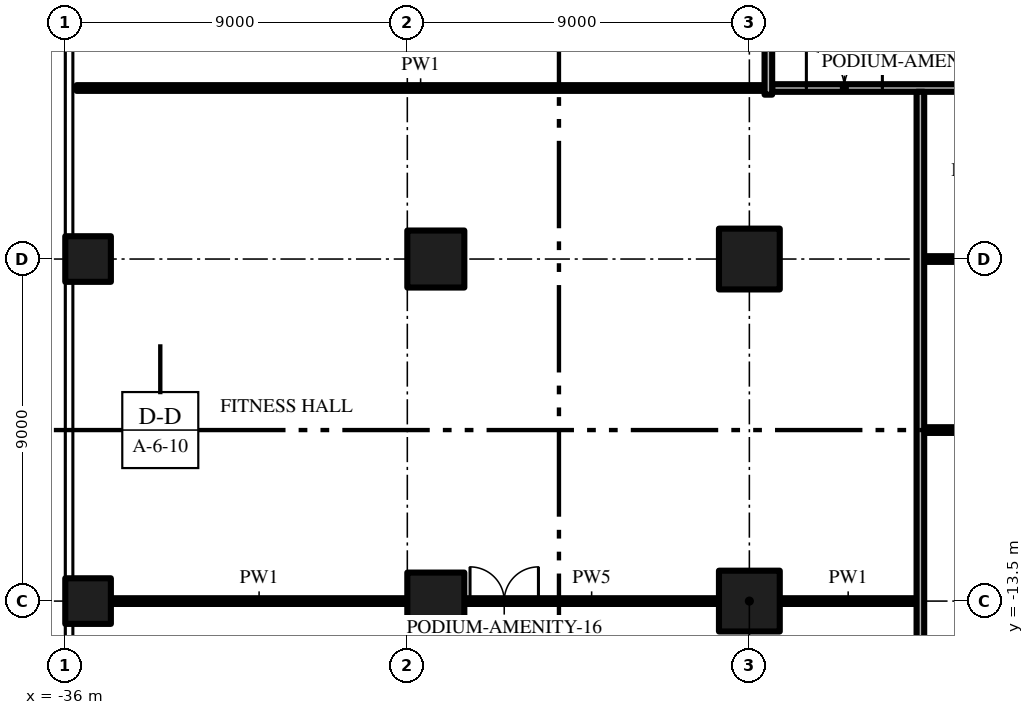
"""IFC4 building model, lengths in metres.
Left out: names, types, materials, properties, quantities, classifications, styles, units other than length and angle.
Written with IfcOpenShell. Run it as: python <this file> out.ifc"""

import sys

from ifc_helpers import new_model, si_unit, direction, frame, frame_2d, origin, origin_2d, place, context, subcontext, project, spatial, rectangle, extrude, element, fill, save


model = new_model("IFC4")
c1 = context("Model", 3, precision=1e-05, world=origin(), true_north=direction((0.0, 1.0)))
c2 = subcontext(c1, "Body", "Model", "MODEL_VIEW")
j1 = project(units=[si_unit("LENGTHUNIT", "METRE"), si_unit("PLANEANGLEUNIT", "RADIAN")], contexts=[c1])
p1 = place(None, origin())
s1 = spatial("IfcSite", under=j1, at=p1, CompositionType="ELEMENT")
p2 = place(p1, origin())
s2 = spatial("IfcBuilding", under=s1, at=p2, CompositionType="ELEMENT")
p3 = place(p2, frame((0.0, 0.0, 6.0)))
s3 = spatial("IfcBuildingStorey", under=s2, at=p3, CompositionType="ELEMENT", Elevation=6.0)
for number, where, z_axis, x_axis in (
    (1, (-35.4, -13.5, 0.0), (0.0, 0.0, 1.0), (1.0, 0.0, 0.0)),
    (2, (-35.4, -4.5, 0.0), (0.0, 0.0, 1.0), (1.0, 0.0, 0.0)),
):
    element("IfcColumn", number, at=place(p3, frame(where, z_axis=z_axis, x_axis=x_axis)), inside=s3, PredefinedType="COLUMN", context=c2, shape_type="SweptSolid", body=[
        extrude(rectangle(XDim=1.2, YDim=1.2, at=origin_2d()), origin(), (0.0, 0.0, 1.0), 4.15),
    ])
for number, where, z_axis, x_axis in (
    (3, (-18.0, -13.5, 0.0), (0.0, 0.0, 1.0), (1.0, 0.0, 0.0)),
    (4, (-18.0, -4.5, 0.0), (0.0, 0.0, 1.0), (1.0, 0.0, 0.0)),
):
    element("IfcColumn", number, at=place(p3, frame(where, z_axis=z_axis, x_axis=x_axis)), inside=s3, PredefinedType="COLUMN", context=c2, shape_type="SweptSolid", body=[
        extrude(rectangle(XDim=1.6, YDim=1.6, at=origin_2d()), origin(), (0.0, 0.0, 1.0), 4.15),
    ])
for number, where, z_axis, x_axis in (
    (5, (-26.25, -13.5, 0.0), (0.0, 0.0, 1.0), (1.0, 0.0, 0.0)),
    (6, (-26.25, -4.5, 0.0), (0.0, 0.0, 1.0), (1.0, 0.0, 0.0)),
):
    element("IfcColumn", number, at=place(p3, frame(where, z_axis=z_axis, x_axis=x_axis)), inside=s3, PredefinedType="COLUMN", context=c2, shape_type="SweptSolid", body=[
        extrude(rectangle(XDim=1.5, YDim=1.5, at=origin_2d()), origin(), (0.0, 0.0, 1.0), 4.15),
    ])
p4 = place(p3, frame((-34.8, -13.5, 0.0), z_axis=(0.0, 0.0, 1.0), x_axis=(1.0, 0.0, 0.0)))
e7 = element("IfcWall", 7, at=p4, inside=s3, PredefinedType="PARTITIONING", context=c2, shape_type="SweptSolid", body=[
    extrude(rectangle(XDim=7.8, YDim=0.15, at=frame_2d((3.9, 0.0))), origin(), (0.0, 0.0, 1.0), 4.15),
])
p5 = place(p3, frame((-25.5, -13.5, 0.0), z_axis=(0.0, 0.0, 1.0), x_axis=(1.0, 0.0, 0.0)))
e8 = element("IfcWall", 8, at=p5, inside=s3, PredefinedType="PARTITIONING", context=c2, shape_type="SweptSolid", body=[
    extrude(rectangle(XDim=6.7, YDim=0.15, at=frame_2d((3.35, 0.0))), origin(), (0.0, 0.0, 1.0), 4.15),
])
p6 = place(p5, frame((0.15, 0.0, 0.0)))
e9 = element("IfcOpeningElement", 9, at=p6, cuts=e8, PredefinedType="OPENING", context=c2, shape_type="SweptSolid", body=[
    extrude(rectangle(XDim=1.8, YDim=2.4, at=frame_2d((0.9, 1.2))), frame((0.0, 0.085, 0.0), z_axis=(0.0, -1.0, 0.0), x_axis=(1.0, 0.0, 0.0)), (0.0, 0.0, 1.0), 0.17),
])
p7 = place(p3, frame((-17.2, -13.5, 0.0), z_axis=(0.0, 0.0, 1.0), x_axis=(1.0, 0.0, 0.0)))
e10 = element("IfcWall", 10, at=p7, inside=s3, PredefinedType="PARTITIONING", context=c2, shape_type="SweptSolid", body=[
    extrude(rectangle(XDim=3.6, YDim=0.15, at=frame_2d((1.8, 0.0))), origin(), (0.0, 0.0, 1.0), 4.15),
])
p8 = place(p3, frame((-4.575, -9.0, 0.0), z_axis=(0.0, 0.0, 1.0), x_axis=(-1.0, 0.0, 0.0)))
e11 = element("IfcWall", 11, at=p8, inside=s3, PredefinedType="PARTITIONING", context=c2, shape_type="SweptSolid", body=[
    extrude(rectangle(XDim=8.825, YDim=0.15, at=frame_2d((4.412, 0.0))), origin(), (0.0, 0.0, 1.0), 4.15),
])
p9 = place(p8, frame((3.575, 0.0, 0.0)))
e12 = element("IfcOpeningElement", 12, at=p9, cuts=e11, PredefinedType="OPENING", context=c2, shape_type="SweptSolid", body=[
    extrude(rectangle(XDim=0.9, YDim=2.1, at=frame_2d((0.45, 1.05))), frame((0.0, 0.085, 0.0), z_axis=(0.0, -1.0, 0.0), x_axis=(1.0, 0.0, 0.0)), (0.0, 0.0, 1.0), 0.17),
])
p10 = place(p3, frame((-13.4, -4.5, 0.0), z_axis=(0.0, 0.0, 1.0), x_axis=(1.0, 0.0, 0.0)))
e13 = element("IfcWall", 13, at=p10, inside=s3, PredefinedType="PARTITIONING", context=c2, shape_type="SweptSolid", body=[
    extrude(rectangle(XDim=3.6, YDim=0.15, at=frame_2d((1.8, 0.0))), origin(), (0.0, 0.0, 1.0), 4.15),
])
p11 = place(p3, frame((-17.4, 0.0, 0.0), z_axis=(0.0, 0.0, 1.0), x_axis=(1.0, 0.0, 0.0)))
e14 = element("IfcWall", 14, at=p11, inside=s3, PredefinedType="PARTITIONING", context=c2, shape_type="SweptSolid", body=[
    extrude(rectangle(XDim=34.8, YDim=0.2, at=frame_2d((17.4, 0.0))), origin(), (0.0, 0.0, 1.0), 4.15),
])
p12 = place(p11, frame((0.9, 0.0, 0.0)))
e15 = element("IfcOpeningElement", 15, at=p12, cuts=e14, PredefinedType="OPENING", context=c2, shape_type="SweptSolid", body=[
    extrude(rectangle(XDim=2.0, YDim=2.4, at=frame_2d((1.0, 1.2))), frame((0.0, 0.11, 0.0), z_axis=(0.0, -1.0, 0.0), x_axis=(1.0, 0.0, 0.0)), (0.0, 0.0, 1.0), 0.22),
])
p13 = place(p11, frame((16.4, 0.0, 0.0)))
e16 = element("IfcOpeningElement", 16, at=p13, cuts=e14, PredefinedType="OPENING", context=c2, shape_type="SweptSolid", body=[
    extrude(rectangle(XDim=2.0, YDim=2.4, at=frame_2d((1.0, 1.2))), frame((0.0, 0.11, 0.0), z_axis=(0.0, -1.0, 0.0), x_axis=(1.0, 0.0, 0.0)), (0.0, 0.0, 1.0), 0.22),
])
p14 = place(p11, frame((32.0, 0.0, 0.0)))
e17 = element("IfcOpeningElement", 17, at=p14, cuts=e14, PredefinedType="OPENING", context=c2, shape_type="SweptSolid", body=[
    extrude(rectangle(XDim=1.8, YDim=2.4, at=frame_2d((0.9, 1.2))), frame((0.0, 0.11, 0.0), z_axis=(0.0, -1.0, 0.0), x_axis=(1.0, 0.0, 0.0)), (0.0, 0.0, 1.0), 0.22),
])
p15 = place(p3, frame((-35.7, 0.0, 0.0), z_axis=(0.0, 0.0, 1.0), x_axis=(1.0, 0.0, 0.0)))
e18 = element("IfcWall", 18, at=p15, inside=s3, PredefinedType="PARTITIONING", context=c2, shape_type="SweptSolid", body=[
    extrude(rectangle(XDim=18.1, YDim=0.15, at=frame_2d((9.05, 0.0))), origin(), (0.0, 0.0, 1.0), 4.15),
])
p16 = place(p3, frame((-17.5, 3.7, 0.0), z_axis=(0.0, 0.0, 1.0), x_axis=(0.0, -1.0, 0.0)))
e19 = element("IfcWall", 19, at=p16, inside=s3, PredefinedType="PARTITIONING", context=c2, shape_type="SweptSolid", body=[
    extrude(rectangle(XDim=3.875, YDim=0.2, at=frame_2d((1.938, 0.0))), origin(), (0.0, 0.0, 1.0), 4.15),
])
p17 = place(p16, frame((0.45, 0.0, 0.0)))
e20 = element("IfcOpeningElement", 20, at=p17, cuts=e19, PredefinedType="OPENING", context=c2, shape_type="SweptSolid", body=[
    extrude(rectangle(XDim=2.0, YDim=2.4, at=frame_2d((1.0, 1.2))), frame((0.0, 0.11, 0.0), z_axis=(0.0, -1.0, 0.0), x_axis=(1.0, 0.0, 0.0)), (0.0, 0.0, 1.0), 0.22),
])
p18 = place(p3, frame((-13.5, -31.2, 0.0), z_axis=(0.0, 0.0, 1.0), x_axis=(0.0, 1.0, 0.0)))
e21 = element("IfcWall", 21, at=p18, inside=s3, PredefinedType="PARTITIONING", context=c2, shape_type="SweptSolid", body=[
    extrude(rectangle(XDim=31.1, YDim=0.2, at=frame_2d((15.55, 0.0))), origin(), (0.0, 0.0, 1.0), 4.15),
])
p19 = place(p12, origin())
e22 = element("IfcDoor", 22, at=p19, inside=s3, OperationType="DOUBLE_DOOR_SINGLE_SWING", PredefinedType="DOOR", context=c2, shape_type="SweptSolid", body=[
    extrude(rectangle(XDim=2.0, YDim=2.4, at=frame_2d((1.0, 1.2))), frame((0.0, 0.025, 0.0), z_axis=(0.0, -1.0, 0.0), x_axis=(1.0, 0.0, 0.0)), (0.0, 0.0, 1.0), 0.05),
])
fill(e15, e22)
p20 = place(p6, origin())
e23 = element("IfcDoor", 23, at=p20, inside=s3, OperationType="DOUBLE_DOOR_SINGLE_SWING", PredefinedType="DOOR", context=c2, shape_type="SweptSolid", body=[
    extrude(rectangle(XDim=1.8, YDim=2.4, at=frame_2d((0.9, 1.2))), frame((0.0, 0.025, 0.0), z_axis=(0.0, -1.0, 0.0), x_axis=(1.0, 0.0, 0.0)), (0.0, 0.0, 1.0), 0.05),
])
fill(e9, e23)
save(model, sys.argv[1])
